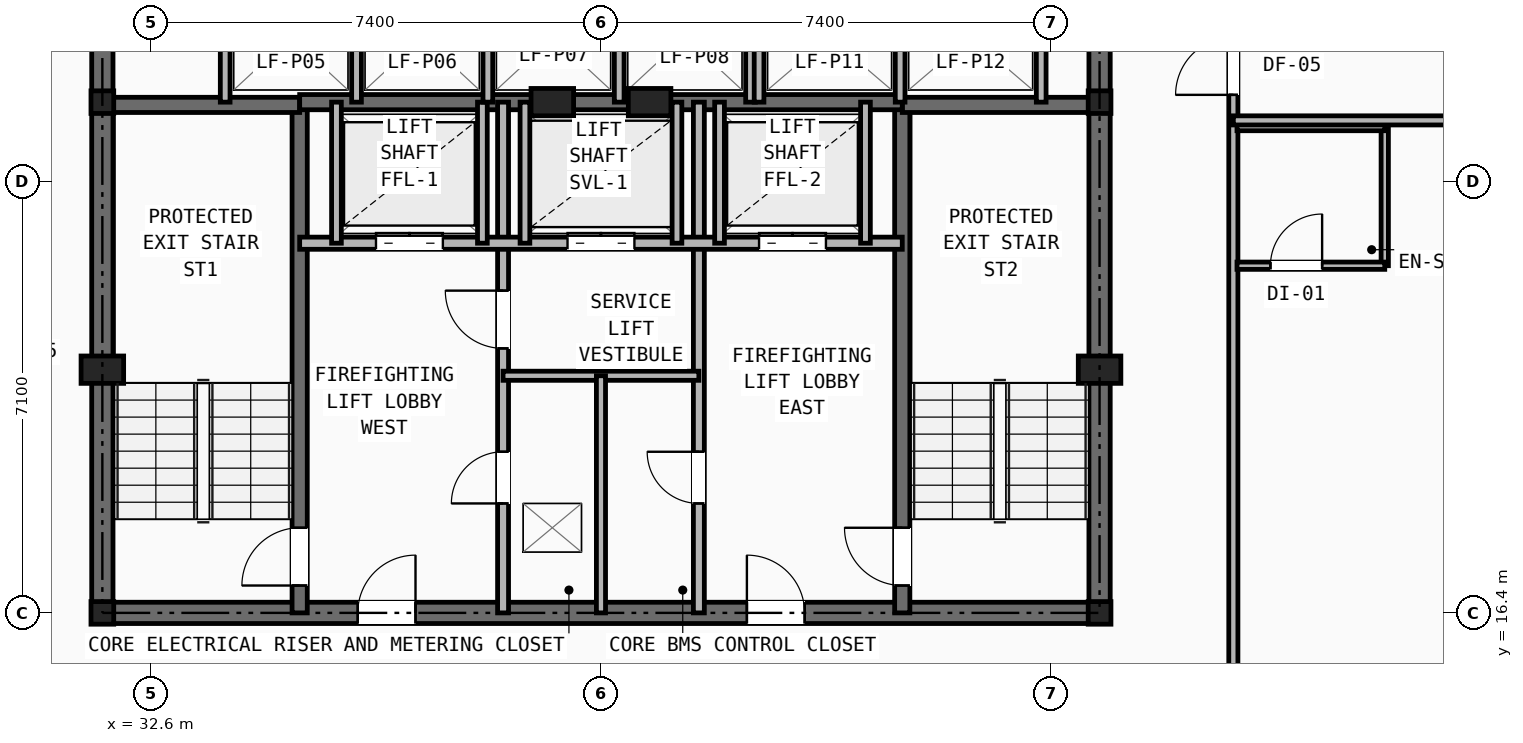
"""IFC4 building model, lengths in metres.
Left out: names, types, materials, properties, quantities, classifications, styles, units other than length and angle.
Written with IfcOpenShell. Run it as: python <this file> out.ifc"""

import sys

from ifc_helpers import new_model, si_unit, direction, frame, frame_2d, origin, origin_2d, place, context, subcontext, project, spatial, rectangle, i_section, extrude, element, fill, save


model = new_model("IFC4")
c1 = context("Model", 3, precision=1e-05, world=origin(), true_north=direction((0.0, 1.0)))
c2 = subcontext(c1, "Body", "Model", "MODEL_VIEW")
j1 = project(units=[si_unit("LENGTHUNIT", "METRE"), si_unit("PLANEANGLEUNIT", "RADIAN")], contexts=[c1])
p1 = place(None, origin())
s1 = spatial("IfcSite", under=j1, at=p1, CompositionType="ELEMENT")
p2 = place(p1, origin())
s2 = spatial("IfcBuilding", under=s1, at=p2, CompositionType="ELEMENT")
p3 = place(p2, frame((0.0, 0.0, 92.6)))
s3 = spatial("IfcBuildingStorey", under=s2, at=p3, CompositionType="ELEMENT", Elevation=92.6)
for number, where, z_axis, x_axis in (
    (1, (31.8, 16.4, 0.0), (0.0, 0.0, 1.0), (1.0, 0.0, 0.0)),
    (2, (48.2, 16.4, 0.0), (0.0, 0.0, 1.0), (1.0, 0.0, 0.0)),
    (3, (31.8, 24.8, 0.0), (0.0, 0.0, 1.0), (1.0, 0.0, 0.0)),
    (4, (48.2, 24.8, 0.0), (0.0, 0.0, 1.0), (1.0, 0.0, 0.0)),
):
    element("IfcColumn", number, at=place(p3, frame(where, z_axis=z_axis, x_axis=x_axis)), inside=s3, PredefinedType="COLUMN", context=c2, shape_type="SweptSolid", body=[
        extrude(i_section(OverallWidth=0.374, OverallDepth=0.372, WebThickness=0.016, FlangeThickness=0.026, at=origin_2d()), origin(), (0.0, 0.0, 1.0), 3.2),
    ])
for number, where, z_axis, x_axis in (
    (5, (31.8, 20.4, 0.0), (0.0, 0.0, 1.0), (1.0, 0.0, 0.0)),
    (6, (48.2, 20.4, 0.0), (0.0, 0.0, 1.0), (1.0, 0.0, 0.0)),
    (7, (39.2, 24.8, 0.0), (0.0, 0.0, 1.0), (1.0, 0.0, 0.0)),
    (8, (40.8, 24.8, 0.0), (0.0, 0.0, 1.0), (1.0, 0.0, 0.0)),
):
    element("IfcColumn", number, at=place(p3, frame(where, z_axis=z_axis, x_axis=x_axis)), inside=s3, PredefinedType="PILASTER", context=c2, shape_type="SweptSolid", body=[
        extrude(rectangle(XDim=0.7, YDim=0.45, at=origin_2d()), origin(), (0.0, 0.0, 1.0), 3.2),
    ])
p4 = place(p3, frame((31.8, 16.4, 0.0), z_axis=(0.0, 0.0, 1.0), x_axis=(1.0, 0.0, 0.0)))
e9 = element("IfcWall", 9, at=p4, inside=s3, PredefinedType="SHEAR", context=c2, shape_type="SweptSolid", body=[
    extrude(rectangle(XDim=16.4, YDim=0.35, at=frame_2d((8.2, 0.0))), origin(), (0.0, 0.0, 1.0), 2.97),
])
p5 = place(p4, frame((4.2, 0.0, 0.0)))
e10 = element("IfcOpeningElement", 10, at=p5, cuts=e9, PredefinedType="OPENING", context=c2, shape_type="SweptSolid", body=[
    extrude(rectangle(XDim=0.95, YDim=2.1, at=frame_2d((0.475, 1.05))), frame((0.0, 0.185, 0.0), z_axis=(0.0, -1.0, 0.0), x_axis=(1.0, 0.0, 0.0)), (0.0, 0.0, 1.0), 0.37),
])
p6 = place(p4, frame((10.6, 0.0, 0.0)))
e11 = element("IfcOpeningElement", 11, at=p6, cuts=e9, PredefinedType="OPENING", context=c2, shape_type="SweptSolid", body=[
    extrude(rectangle(XDim=0.95, YDim=2.1, at=frame_2d((0.475, 1.05))), frame((0.0, 0.185, 0.0), z_axis=(0.0, -1.0, 0.0), x_axis=(1.0, 0.0, 0.0)), (0.0, 0.0, 1.0), 0.37),
])
p7 = place(p3, frame((31.8, 16.4, 0.0), z_axis=(0.0, 0.0, 1.0), x_axis=(0.0, 1.0, 0.0)))
e12 = element("IfcWall", 12, at=p7, inside=s3, PredefinedType="SHEAR", context=c2, shape_type="SweptSolid", body=[
    extrude(rectangle(XDim=14.8, YDim=0.35, at=frame_2d((7.4, 0.0))), origin(), (0.0, 0.0, 1.0), 2.97),
])
p8 = place(p7, frame((11.0, 0.0, 0.0)))
e13 = element("IfcOpeningElement", 13, at=p8, cuts=e12, PredefinedType="OPENING", context=c2, shape_type="SweptSolid", body=[
    extrude(rectangle(XDim=1.1, YDim=2.15, at=frame_2d((0.55, 1.075))), frame((0.0, 0.185, 0.0), z_axis=(0.0, -1.0, 0.0), x_axis=(1.0, 0.0, 0.0)), (0.0, 0.0, 1.0), 0.37),
])
p9 = place(p3, frame((48.2, 16.4, 0.0), z_axis=(0.0, 0.0, 1.0), x_axis=(0.0, 1.0, 0.0)))
e14 = element("IfcWall", 14, at=p9, inside=s3, PredefinedType="SHEAR", context=c2, shape_type="SweptSolid", body=[
    extrude(rectangle(XDim=14.8, YDim=0.35, at=frame_2d((7.4, 0.0))), origin(), (0.0, 0.0, 1.0), 2.97),
])
p10 = place(p9, frame((11.0, 0.0, 0.0)))
e15 = element("IfcOpeningElement", 15, at=p10, cuts=e14, PredefinedType="OPENING", context=c2, shape_type="SweptSolid", body=[
    extrude(rectangle(XDim=1.1, YDim=2.15, at=frame_2d((0.55, 1.075))), frame((0.0, 0.185, 0.0), z_axis=(0.0, -1.0, 0.0), x_axis=(1.0, 0.0, 0.0)), (0.0, 0.0, 1.0), 0.37),
])
p11 = place(p3, frame((35.045, 16.4, 0.0), z_axis=(0.0, 0.0, 1.0), x_axis=(0.0, 1.0, 0.0)))
e16 = element("IfcWall", 16, at=p11, inside=s3, PredefinedType="SHEAR", context=c2, shape_type="SweptSolid", body=[
    extrude(rectangle(XDim=8.4, YDim=0.25, at=frame_2d((4.2, 0.0))), origin(), (0.0, 0.0, 1.0), 2.97),
])
p12 = place(p11, frame((0.45, 0.0, 0.0)))
e17 = element("IfcOpeningElement", 17, at=p12, cuts=e16, PredefinedType="OPENING", context=c2, shape_type="SweptSolid", body=[
    extrude(rectangle(XDim=0.95, YDim=2.1, at=frame_2d((0.475, 1.05))), frame((0.0, 0.135, 0.0), z_axis=(0.0, -1.0, 0.0), x_axis=(1.0, 0.0, 0.0)), (0.0, 0.0, 1.0), 0.27),
])
p13 = place(p3, frame((31.8, 24.755, 0.0), z_axis=(0.0, 0.0, 1.0), x_axis=(1.0, 0.0, 0.0)))
e18 = element("IfcWall", 18, at=p13, inside=s3, PredefinedType="SHEAR", context=c2, shape_type="SweptSolid", body=[
    extrude(rectangle(XDim=3.245, YDim=0.25, at=frame_2d((1.623, 0.0))), origin(), (0.0, 0.0, 1.0), 2.97),
])
p14 = place(p3, frame((44.955, 16.4, 0.0), z_axis=(0.0, 0.0, 1.0), x_axis=(0.0, 1.0, 0.0)))
e19 = element("IfcWall", 19, at=p14, inside=s3, PredefinedType="SHEAR", context=c2, shape_type="SweptSolid", body=[
    extrude(rectangle(XDim=8.4, YDim=0.25, at=frame_2d((4.2, 0.0))), origin(), (0.0, 0.0, 1.0), 2.97),
])
p15 = place(p14, frame((0.45, 0.0, 0.0)))
e20 = element("IfcOpeningElement", 20, at=p15, cuts=e19, PredefinedType="OPENING", context=c2, shape_type="SweptSolid", body=[
    extrude(rectangle(XDim=0.95, YDim=2.1, at=frame_2d((0.475, 1.05))), frame((0.0, 0.135, 0.0), z_axis=(0.0, -1.0, 0.0), x_axis=(1.0, 0.0, 0.0)), (0.0, 0.0, 1.0), 0.27),
])
p16 = place(p3, frame((44.955, 24.755, 0.0), z_axis=(0.0, 0.0, 1.0), x_axis=(1.0, 0.0, 0.0)))
e21 = element("IfcWall", 21, at=p16, inside=s3, PredefinedType="SHEAR", context=c2, shape_type="SweptSolid", body=[
    extrude(rectangle(XDim=3.245, YDim=0.25, at=frame_2d((1.623, 0.0))), origin(), (0.0, 0.0, 1.0), 2.97),
])
p17 = place(p3, frame((35.045, 24.8, 0.0), z_axis=(0.0, 0.0, 1.0), x_axis=(1.0, 0.0, 0.0)))
e22 = element("IfcWall", 22, at=p17, inside=s3, PredefinedType="SHEAR", context=c2, shape_type="SweptSolid", body=[
    extrude(rectangle(XDim=9.91, YDim=0.25, at=frame_2d((4.955, 0.0))), origin(), (0.0, 0.0, 1.0), 2.97),
])
p18 = place(p3, frame((38.39, 16.4, 0.0), z_axis=(0.0, 0.0, 1.0), x_axis=(0.0, 1.0, 0.0)))
e23 = element("IfcWall", 23, at=p18, inside=s3, PredefinedType="PARTITIONING", context=c2, shape_type="SweptSolid", body=[
    extrude(rectangle(XDim=8.4, YDim=0.18, at=frame_2d((4.2, 0.0))), origin(), (0.0, 0.0, 1.0), 2.421),
])
p19 = place(p18, frame((1.8, 0.0, 0.0)))
e24 = element("IfcOpeningElement", 24, at=p19, cuts=e23, PredefinedType="OPENING", context=c2, shape_type="SweptSolid", body=[
    extrude(rectangle(XDim=0.85, YDim=2.05, at=frame_2d((0.425, 1.025))), frame((0.0, 0.1, 0.0), z_axis=(0.0, -1.0, 0.0), x_axis=(1.0, 0.0, 0.0)), (0.0, 0.0, 1.0), 0.2),
])
p20 = place(p18, frame((4.35, 0.0, 0.0)))
e25 = element("IfcOpeningElement", 25, at=p20, cuts=e23, PredefinedType="OPENING", context=c2, shape_type="SweptSolid", body=[
    extrude(rectangle(XDim=0.95, YDim=2.1, at=frame_2d((0.475, 1.05))), frame((0.0, 0.1, 0.0), z_axis=(0.0, -1.0, 0.0), x_axis=(1.0, 0.0, 0.0)), (0.0, 0.0, 1.0), 0.2),
])
p21 = place(p3, frame((41.61, 16.4, 0.0), z_axis=(0.0, 0.0, 1.0), x_axis=(0.0, 1.0, 0.0)))
e26 = element("IfcWall", 26, at=p21, inside=s3, PredefinedType="PARTITIONING", context=c2, shape_type="SweptSolid", body=[
    extrude(rectangle(XDim=8.4, YDim=0.18, at=frame_2d((4.2, 0.0))), origin(), (0.0, 0.0, 1.0), 2.421),
])
p22 = place(p21, frame((1.8, 0.0, 0.0)))
e27 = element("IfcOpeningElement", 27, at=p22, cuts=e26, PredefinedType="OPENING", context=c2, shape_type="SweptSolid", body=[
    extrude(rectangle(XDim=0.85, YDim=2.05, at=frame_2d((0.425, 1.025))), frame((0.0, 0.1, 0.0), z_axis=(0.0, -1.0, 0.0), x_axis=(1.0, 0.0, 0.0)), (0.0, 0.0, 1.0), 0.2),
])
p23 = place(p3, frame((35.045, 22.48, 0.0), z_axis=(0.0, 0.0, 1.0), x_axis=(1.0, 0.0, 0.0)))
e28 = element("IfcWall", 28, at=p23, inside=s3, PredefinedType="SOLIDWALL", context=c2, shape_type="SweptSolid", body=[
    extrude(rectangle(XDim=9.91, YDim=0.2, at=frame_2d((4.955, 0.0))), origin(), (0.0, 0.0, 1.0), 2.97),
])
p24 = place(p23, frame((1.255, 0.0, 0.0)))
e29 = element("IfcOpeningElement", 29, at=p24, cuts=e28, PredefinedType="OPENING", context=c2, shape_type="SweptSolid", body=[
    extrude(rectangle(XDim=1.1, YDim=2.15, at=frame_2d((0.55, 1.075))), frame((0.0, 0.11, 0.0), z_axis=(0.0, -1.0, 0.0), x_axis=(1.0, 0.0, 0.0)), (0.0, 0.0, 1.0), 0.22),
])
p25 = place(p23, frame((7.555, 0.0, 0.0)))
e30 = element("IfcOpeningElement", 30, at=p25, cuts=e28, PredefinedType="OPENING", context=c2, shape_type="SweptSolid", body=[
    extrude(rectangle(XDim=1.1, YDim=2.15, at=frame_2d((0.55, 1.075))), frame((0.0, 0.11, 0.0), z_axis=(0.0, -1.0, 0.0), x_axis=(1.0, 0.0, 0.0)), (0.0, 0.0, 1.0), 0.22),
])
p26 = place(p23, frame((4.405, 0.0, 0.0)))
e31 = element("IfcOpeningElement", 31, at=p26, cuts=e28, PredefinedType="OPENING", context=c2, shape_type="SweptSolid", body=[
    extrude(rectangle(XDim=1.1, YDim=2.15, at=frame_2d((0.55, 1.075))), frame((0.0, 0.11, 0.0), z_axis=(0.0, -1.0, 0.0), x_axis=(1.0, 0.0, 0.0)), (0.0, 0.0, 1.0), 0.22),
])
p27 = place(p3, frame((38.39, 20.3, 0.0), z_axis=(0.0, 0.0, 1.0), x_axis=(1.0, 0.0, 0.0)))
e32 = element("IfcWall", 32, at=p27, inside=s3, PredefinedType="PARTITIONING", context=c2, shape_type="SweptSolid", body=[
    extrude(rectangle(XDim=3.22, YDim=0.15, at=frame_2d((1.61, 0.0))), origin(), (0.0, 0.0, 1.0), 2.97),
])
p28 = place(p3, frame((40.0, 16.4, 0.0), z_axis=(0.0, 0.0, 1.0), x_axis=(0.0, 1.0, 0.0)))
e33 = element("IfcWall", 33, at=p28, inside=s3, PredefinedType="PARTITIONING", context=c2, shape_type="SweptSolid", body=[
    extrude(rectangle(XDim=3.9, YDim=0.15, at=frame_2d((1.95, 0.0))), origin(), (0.0, 0.0, 1.0), 2.421),
])
for number, where, z_axis, x_axis in (
    (34, (35.65, 22.48, 0.0), (0.0, 0.0, 1.0), (0.0, 1.0, 0.0)),
    (35, (38.05, 22.48, 0.0), (0.0, 0.0, 1.0), (0.0, 1.0, 0.0)),
    (36, (41.95, 22.48, 0.0), (0.0, 0.0, 1.0), (0.0, 1.0, 0.0)),
    (37, (44.35, 22.48, 0.0), (0.0, 0.0, 1.0), (0.0, 1.0, 0.0)),
    (38, (38.75, 22.48, 0.0), (0.0, 0.0, 1.0), (0.0, 1.0, 0.0)),
    (39, (41.25, 22.48, 0.0), (0.0, 0.0, 1.0), (0.0, 1.0, 0.0)),
):
    element("IfcWall", number, at=place(p3, frame(where, z_axis=z_axis, x_axis=x_axis)), inside=s3, PredefinedType="SOLIDWALL", context=c2, shape_type="SweptSolid", body=[
        extrude(rectangle(XDim=2.32, YDim=0.16, at=frame_2d((1.16, 0.0))), origin(), (0.0, 0.0, 1.0), 2.97),
    ])
for number, where, z_axis, x_axis in (
    (40, (33.82, 24.8, 0.0), (0.0, 0.0, 1.0), (0.0, 1.0, 0.0)),
    (41, (35.98, 24.8, 0.0), (0.0, 0.0, 1.0), (0.0, 1.0, 0.0)),
    (42, (38.14, 24.8, 0.0), (0.0, 0.0, 1.0), (0.0, 1.0, 0.0)),
    (43, (40.3, 24.8, 0.0), (0.0, 0.0, 1.0), (0.0, 1.0, 0.0)),
    (44, (42.46, 24.8, 0.0), (0.0, 0.0, 1.0), (0.0, 1.0, 0.0)),
    (45, (42.6, 24.8, 0.0), (0.0, 0.0, 1.0), (0.0, 1.0, 0.0)),
    (46, (44.92, 24.8, 0.0), (0.0, 0.0, 1.0), (0.0, 1.0, 0.0)),
    (47, (47.24, 24.8, 0.0), (0.0, 0.0, 1.0), (0.0, 1.0, 0.0)),
):
    element("IfcWall", number, at=place(p3, frame(where, z_axis=z_axis, x_axis=x_axis)), inside=s3, PredefinedType="SOLIDWALL", context=c2, shape_type="SweptSolid", body=[
        extrude(rectangle(XDim=2.08, YDim=0.16, at=frame_2d((1.04, 0.0))), origin(), (0.0, 0.0, 1.0), 2.97),
    ])
p29 = place(p3, frame((50.4, 14.1, 0.0), z_axis=(0.0, 0.0, 1.0), x_axis=(0.0, 1.0, 0.0)))
e48 = element("IfcWall", 48, at=p29, inside=s3, PredefinedType="PARTITIONING", context=c2, shape_type="SweptSolid", body=[
    extrude(rectangle(XDim=21.9, YDim=0.15, at=frame_2d((10.95, 0.0))), origin(), (0.0, 0.0, 1.0), 2.421),
])
p30 = place(p29, frame((0.42, 0.0, 0.0)))
e49 = element("IfcOpeningElement", 49, at=p30, cuts=e48, PredefinedType="OPENING", context=c2, shape_type="SweptSolid", body=[
    extrude(rectangle(XDim=0.95, YDim=2.1, at=frame_2d((0.475, 1.05))), frame((0.0, 0.085, 0.0), z_axis=(0.0, -1.0, 0.0), x_axis=(1.0, 0.0, 0.0)), (0.0, 0.0, 1.0), 0.17),
])
p31 = place(p29, frame((10.82, 0.0, 0.0)))
e50 = element("IfcOpeningElement", 50, at=p31, cuts=e48, PredefinedType="OPENING", context=c2, shape_type="SweptSolid", body=[
    extrude(rectangle(XDim=0.95, YDim=2.1, at=frame_2d((0.475, 1.05))), frame((0.0, 0.085, 0.0), z_axis=(0.0, -1.0, 0.0), x_axis=(1.0, 0.0, 0.0)), (0.0, 0.0, 1.0), 0.17),
])
p32 = place(p3, frame((52.89, 22.11, 0.0), z_axis=(0.0, 0.0, 1.0), x_axis=(0.0, 1.0, 0.0)))
e51 = element("IfcWall", 51, at=p32, inside=s3, PredefinedType="PARTITIONING", context=c2, shape_type="SweptSolid", body=[
    extrude(rectangle(XDim=2.28, YDim=0.12, at=frame_2d((1.14, 0.0))), origin(), (0.0, 0.0, 1.0), 2.97),
])
p33 = place(p3, frame((50.46, 22.11, 0.0), z_axis=(0.0, 0.0, 1.0), x_axis=(1.0, 0.0, 0.0)))
e52 = element("IfcWall", 52, at=p33, inside=s3, PredefinedType="PARTITIONING", context=c2, shape_type="SweptSolid", body=[
    extrude(rectangle(XDim=2.43, YDim=0.12, at=frame_2d((1.215, 0.0))), origin(), (0.0, 0.0, 1.0), 2.97),
])
p34 = place(p33, frame((0.55, 0.0, 0.0)))
e53 = element("IfcOpeningElement", 53, at=p34, cuts=e52, PredefinedType="OPENING", context=c2, shape_type="SweptSolid", body=[
    extrude(rectangle(XDim=0.85, YDim=2.05, at=frame_2d((0.425, 1.025))), frame((0.0, 0.07, 0.0), z_axis=(0.0, -1.0, 0.0), x_axis=(1.0, 0.0, 0.0)), (0.0, 0.0, 1.0), 0.14),
])
p35 = place(p3, frame((50.46, 24.39, 0.0), z_axis=(0.0, 0.0, 1.0), x_axis=(1.0, 0.0, 0.0)))
e54 = element("IfcWall", 54, at=p35, inside=s3, PredefinedType="PARTITIONING", context=c2, shape_type="SweptSolid", body=[
    extrude(rectangle(XDim=2.43, YDim=0.12, at=frame_2d((1.215, 0.0))), origin(), (0.0, 0.0, 1.0), 2.97),
])
p36 = place(p3, frame((50.4, 24.5, 0.0), z_axis=(0.0, 0.0, 1.0), x_axis=(1.0, 0.0, 0.0)))
e55 = element("IfcWall", 55, at=p36, inside=s3, PredefinedType="PARTITIONING", context=c2, shape_type="SweptSolid", body=[
    extrude(rectangle(XDim=11.59, YDim=0.15, at=frame_2d((5.795, 0.0))), origin(), (0.0, 0.0, 1.0), 2.258),
])
p37 = place(p19, origin())
e56 = element("IfcDoor", 56, at=p37, inside=s3, OperationType="SINGLE_SWING_LEFT", PredefinedType="DOOR", context=c2, shape_type="SweptSolid", body=[
    extrude(rectangle(XDim=0.85, YDim=2.05, at=frame_2d((0.425, 1.025))), frame((0.0, 0.025, 0.0), z_axis=(0.0, -1.0, 0.0), x_axis=(1.0, 0.0, 0.0)), (0.0, 0.0, 1.0), 0.05),
])
fill(e24, e56)
p38 = place(p22, origin())
e57 = element("IfcDoor", 57, at=p38, inside=s3, OperationType="SINGLE_SWING_RIGHT", PredefinedType="DOOR", context=c2, shape_type="SweptSolid", body=[
    extrude(rectangle(XDim=0.85, YDim=2.05, at=frame_2d((0.425, 1.025))), frame((0.0, 0.025, 0.0), z_axis=(0.0, -1.0, 0.0), x_axis=(1.0, 0.0, 0.0)), (0.0, 0.0, 1.0), 0.05),
])
fill(e27, e57)
p39 = place(p20, origin())
e58 = element("IfcDoor", 58, at=p39, inside=s3, OperationType="SINGLE_SWING_RIGHT", PredefinedType="DOOR", context=c2, shape_type="SweptSolid", body=[
    extrude(rectangle(XDim=0.95, YDim=2.1, at=frame_2d((0.475, 1.05))), frame((0.0, 0.025, 0.0), z_axis=(0.0, -1.0, 0.0), x_axis=(1.0, 0.0, 0.0)), (0.0, 0.0, 1.0), 0.05),
])
fill(e25, e58)
p40 = place(p12, origin())
e59 = element("IfcDoor", 59, at=p40, inside=s3, OperationType="SINGLE_SWING_LEFT", PredefinedType="DOOR", context=c2, shape_type="SweptSolid", body=[
    extrude(rectangle(XDim=0.95, YDim=2.1, at=frame_2d((0.475, 1.05))), frame((0.0, 0.025, 0.0), z_axis=(0.0, -1.0, 0.0), x_axis=(1.0, 0.0, 0.0)), (0.0, 0.0, 1.0), 0.05),
])
fill(e17, e59)
p41 = place(p15, origin())
e60 = element("IfcDoor", 60, at=p41, inside=s3, OperationType="SINGLE_SWING_RIGHT", PredefinedType="DOOR", context=c2, shape_type="SweptSolid", body=[
    extrude(rectangle(XDim=0.95, YDim=2.1, at=frame_2d((0.475, 1.05))), frame((0.0, 0.025, 0.0), z_axis=(0.0, -1.0, 0.0), x_axis=(1.0, 0.0, 0.0)), (0.0, 0.0, 1.0), 0.05),
])
fill(e20, e60)
p42 = place(p5, origin())
e61 = element("IfcDoor", 61, at=p42, inside=s3, OperationType="SINGLE_SWING_RIGHT", PredefinedType="DOOR", context=c2, shape_type="SweptSolid", body=[
    extrude(rectangle(XDim=0.95, YDim=2.1, at=frame_2d((0.475, 1.05))), frame((0.0, 0.025, 0.0), z_axis=(0.0, -1.0, 0.0), x_axis=(1.0, 0.0, 0.0)), (0.0, 0.0, 1.0), 0.05),
])
fill(e10, e61)
p43 = place(p6, origin())
e62 = element("IfcDoor", 62, at=p43, inside=s3, OperationType="SINGLE_SWING_LEFT", PredefinedType="DOOR", context=c2, shape_type="SweptSolid", body=[
    extrude(rectangle(XDim=0.95, YDim=2.1, at=frame_2d((0.475, 1.05))), frame((0.0, 0.025, 0.0), z_axis=(0.0, -1.0, 0.0), x_axis=(1.0, 0.0, 0.0)), (0.0, 0.0, 1.0), 0.05),
])
fill(e11, e62)
p44 = place(p24, origin())
e63 = element("IfcDoor", 63, at=p44, inside=s3, OperationType="DOUBLE_DOOR_SLIDING", PredefinedType="DOOR", context=c2, shape_type="SweptSolid", body=[
    extrude(rectangle(XDim=1.1, YDim=2.15, at=frame_2d((0.55, 1.075))), frame((0.0, 0.025, 0.0), z_axis=(0.0, -1.0, 0.0), x_axis=(1.0, 0.0, 0.0)), (0.0, 0.0, 1.0), 0.05),
])
fill(e29, e63)
p45 = place(p25, origin())
e64 = element("IfcDoor", 64, at=p45, inside=s3, OperationType="DOUBLE_DOOR_SLIDING", PredefinedType="DOOR", context=c2, shape_type="SweptSolid", body=[
    extrude(rectangle(XDim=1.1, YDim=2.15, at=frame_2d((0.55, 1.075))), frame((0.0, 0.025, 0.0), z_axis=(0.0, -1.0, 0.0), x_axis=(1.0, 0.0, 0.0)), (0.0, 0.0, 1.0), 0.05),
])
fill(e30, e64)
p46 = place(p26, origin())
e65 = element("IfcDoor", 65, at=p46, inside=s3, OperationType="DOUBLE_DOOR_SLIDING", PredefinedType="DOOR", context=c2, shape_type="SweptSolid", body=[
    extrude(rectangle(XDim=1.1, YDim=2.15, at=frame_2d((0.55, 1.075))), frame((0.0, 0.025, 0.0), z_axis=(0.0, -1.0, 0.0), x_axis=(1.0, 0.0, 0.0)), (0.0, 0.0, 1.0), 0.05),
])
fill(e31, e65)
p47 = place(p34, origin())
e66 = element("IfcDoor", 66, at=p47, inside=s3, OperationType="SINGLE_SWING_RIGHT", PredefinedType="DOOR", context=c2, shape_type="SweptSolid", body=[
    extrude(rectangle(XDim=0.85, YDim=2.05, at=frame_2d((0.425, 1.025))), frame((0.0, 0.025, 0.0), z_axis=(0.0, -1.0, 0.0), x_axis=(1.0, 0.0, 0.0)), (0.0, 0.0, 1.0), 0.05),
])
fill(e53, e66)
p48 = place(p31, origin())
e67 = element("IfcDoor", 67, at=p48, inside=s3, OperationType="SINGLE_SWING_LEFT", PredefinedType="DOOR", context=c2, shape_type="SweptSolid", body=[
    extrude(rectangle(XDim=0.95, YDim=2.1, at=frame_2d((0.475, 1.05))), frame((0.0, 0.025, 0.0), z_axis=(0.0, -1.0, 0.0), x_axis=(1.0, 0.0, 0.0)), (0.0, 0.0, 1.0), 0.05),
])
fill(e50, e67)
save(model, sys.argv[1])
